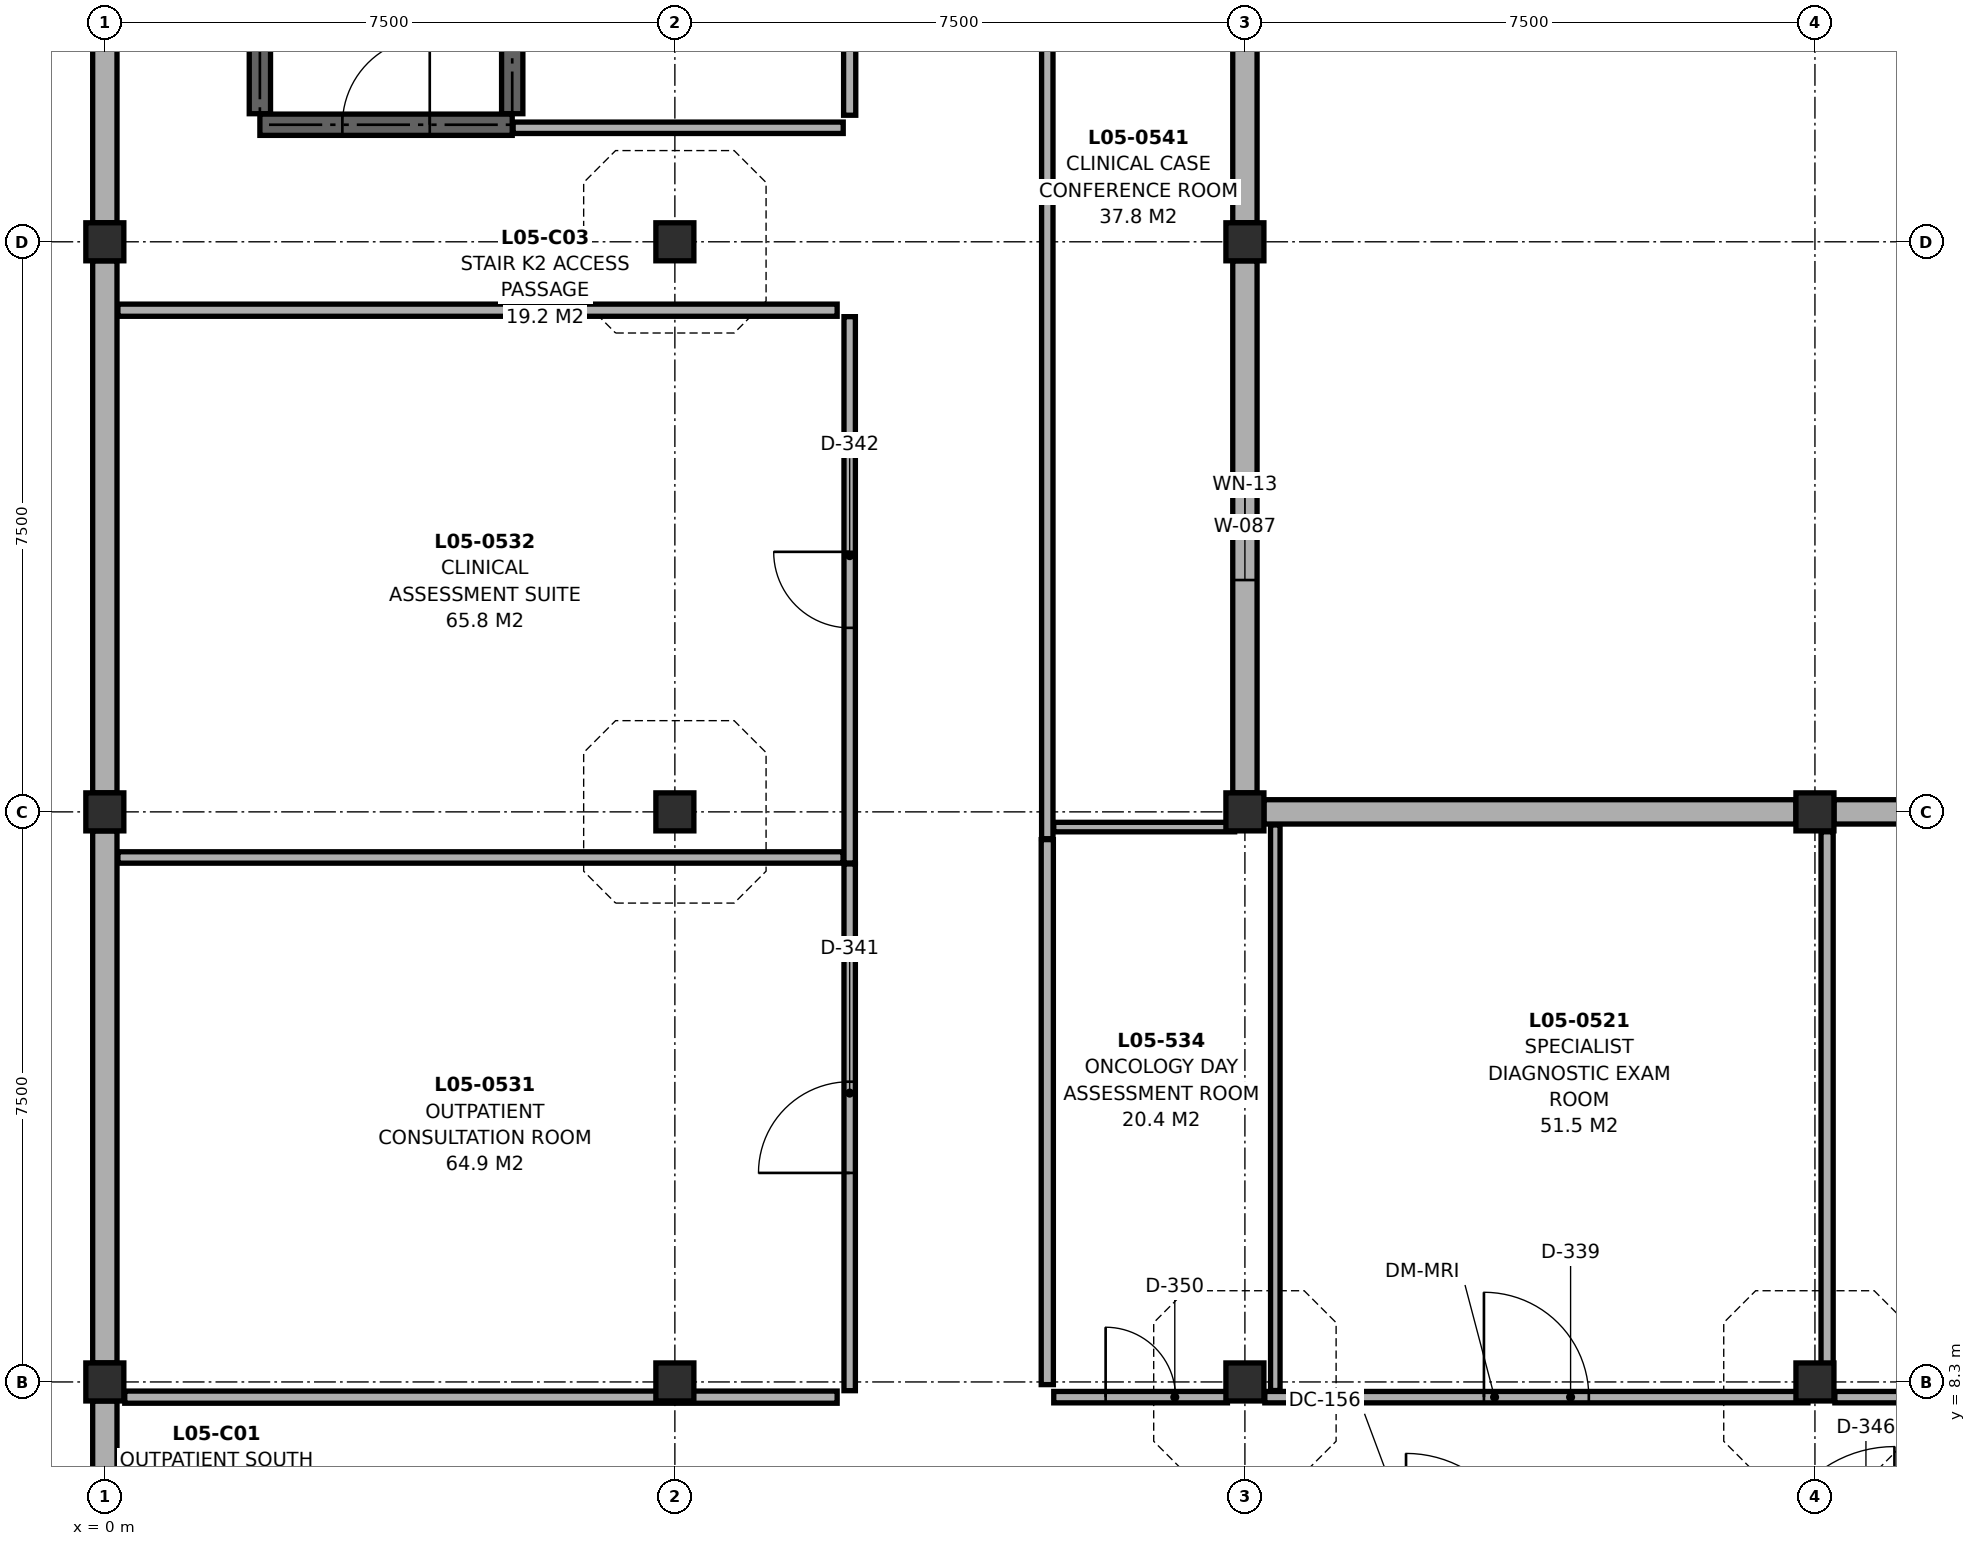
"""IFC4 building model, lengths in metres.
Left out: names, types, materials, properties, quantities, classifications, styles, units other than length and angle.
Written with IfcOpenShell. Run it as: python <this file> out.ifc"""

import sys

from ifc_helpers import new_model, si_unit, direction, frame, frame_2d, origin, origin_2d, place, context, subcontext, project, spatial, rectangle, extrude, element, fill, save


model = new_model("IFC4")
c1 = context("Model", 3, precision=1e-05, world=origin(), true_north=direction((0.0, 1.0)))
c2 = subcontext(c1, "Body", "Model", "MODEL_VIEW")
j1 = project(units=[si_unit("LENGTHUNIT", "METRE"), si_unit("PLANEANGLEUNIT", "RADIAN")], contexts=[c1])
p1 = place(None, origin())
s1 = spatial("IfcSite", under=j1, at=p1, CompositionType="ELEMENT")
p2 = place(p1, origin())
s2 = spatial("IfcBuilding", under=s1, at=p2, CompositionType="ELEMENT")
p3 = place(p2, frame((0.0, 0.0, 21.5)))
s3 = spatial("IfcBuildingStorey", under=s2, at=p3, CompositionType="ELEMENT", Elevation=21.5)
p4 = place(p3, frame((0.0, 8.3, 0.0), z_axis=(0.0, 0.0, 1.0), x_axis=(1.0, 0.0, 0.0)))
e1 = element("IfcColumn", 1, at=p4, inside=s3, PredefinedType="COLUMN", context=c2, shape_type="SweptSolid", body=[
    extrude(rectangle(XDim=0.5, YDim=0.5, at=origin_2d()), origin(), (0.0, 0.0, 1.0), 3.83),
])
for number, where, z_axis, x_axis in (
    (2, (0.0, 15.8, 0.0), (0.0, 0.0, 1.0), (1.0, 0.0, 0.0)),
    (3, (0.0, 23.3, 0.0), (0.0, 0.0, 1.0), (1.0, 0.0, 0.0)),
):
    element("IfcColumn", number, at=place(p3, frame(where, z_axis=z_axis, x_axis=x_axis)), inside=s3, PredefinedType="COLUMN", context=c2, shape_type="SweptSolid", body=[
        extrude(rectangle(XDim=0.5, YDim=0.5, at=origin_2d()), origin(), (0.0, 0.0, 1.0), 3.8),
    ])
p5 = place(p3, frame((7.5, 8.3, 0.0), z_axis=(0.0, 0.0, 1.0), x_axis=(1.0, 0.0, 0.0)))
e4 = element("IfcColumn", 4, at=p5, inside=s3, PredefinedType="COLUMN", context=c2, shape_type="SweptSolid", body=[
    extrude(rectangle(XDim=0.5, YDim=0.5, at=origin_2d()), origin(), (0.0, 0.0, 1.0), 4.08),
])
for number, where, z_axis, x_axis in (
    (5, (7.5, 15.8, 0.0), (0.0, 0.0, 1.0), (1.0, 0.0, 0.0)),
    (6, (7.5, 23.3, 0.0), (0.0, 0.0, 1.0), (1.0, 0.0, 0.0)),
):
    element("IfcColumn", number, at=place(p3, frame(where, z_axis=z_axis, x_axis=x_axis)), inside=s3, PredefinedType="COLUMN", context=c2, shape_type="SweptSolid", body=[
        extrude(rectangle(XDim=0.5, YDim=0.5, at=origin_2d()), origin(), (0.0, 0.0, 1.0), 3.8),
    ])
p6 = place(p3, frame((15.0, 8.3, 0.0), z_axis=(0.0, 0.0, 1.0), x_axis=(1.0, 0.0, 0.0)))
e7 = element("IfcColumn", 7, at=p6, inside=s3, PredefinedType="COLUMN", context=c2, shape_type="SweptSolid", body=[
    extrude(rectangle(XDim=0.5, YDim=0.5, at=origin_2d()), origin(), (0.0, 0.0, 1.0), 4.33),
])
for number, where, z_axis, x_axis in (
    (8, (15.0, 15.8, 0.0), (0.0, 0.0, 1.0), (1.0, 0.0, 0.0)),
    (9, (15.0, 23.3, 0.0), (0.0, 0.0, 1.0), (1.0, 0.0, 0.0)),
):
    element("IfcColumn", number, at=place(p3, frame(where, z_axis=z_axis, x_axis=x_axis)), inside=s3, PredefinedType="COLUMN", context=c2, shape_type="SweptSolid", body=[
        extrude(rectangle(XDim=0.5, YDim=0.5, at=origin_2d()), origin(), (0.0, 0.0, 1.0), 3.8),
    ])
for number, where, z_axis, x_axis in (
    (10, (22.5, 8.3, 0.0), (0.0, 0.0, 1.0), (1.0, 0.0, 0.0)),
    (11, (22.5, 15.8, 0.0), (0.0, 0.0, 1.0), (1.0, 0.0, 0.0)),
):
    element("IfcColumn", number, at=place(p3, frame(where, z_axis=z_axis, x_axis=x_axis)), inside=s3, PredefinedType="COLUMN", context=c2, shape_type="SweptSolid", body=[
        extrude(rectangle(XDim=0.5, YDim=0.5, at=origin_2d()), origin(), (0.0, 0.0, 1.0), 4.58),
    ])
p7 = place(p3, frame((15.0, 30.55, 0.0), z_axis=(0.0, 0.0, 1.0), x_axis=(0.0, -1.0, 0.0)))
e12 = element("IfcWall", 12, at=p7, inside=s3, PredefinedType="SOLIDWALL", context=c2, shape_type="SweptSolid", body=[
    extrude(rectangle(XDim=7.0, YDim=0.32, at=frame_2d((3.5, 0.0))), origin(), (0.0, 0.0, 1.0), 3.7),
])
p8 = place(p7, frame((2.8, 0.0, 0.9)))
e13 = element("IfcOpeningElement", 13, at=p8, cuts=e12, PredefinedType="OPENING", context=c2, shape_type="SweptSolid", body=[
    extrude(rectangle(XDim=1.4, YDim=1.9, at=frame_2d((0.7, 0.95))), frame((0.0, 0.172, 0.0), z_axis=(0.0, -1.0, 0.0), x_axis=(1.0, 0.0, 0.0)), (0.0, 0.0, 1.0), 0.344),
])
p9 = place(p3, frame((15.0, 23.05, 0.0), z_axis=(0.0, 0.0, 1.0), x_axis=(0.0, -1.0, 0.0)))
e14 = element("IfcWall", 14, at=p9, inside=s3, PredefinedType="SOLIDWALL", context=c2, shape_type="SweptSolid", body=[
    extrude(rectangle(XDim=7.0, YDim=0.32, at=frame_2d((3.5, 0.0))), origin(), (0.0, 0.0, 1.0), 3.7),
])
p10 = place(p9, frame((2.8, 0.0, 0.9)))
e15 = element("IfcOpeningElement", 15, at=p10, cuts=e14, PredefinedType="OPENING", context=c2, shape_type="SweptSolid", body=[
    extrude(rectangle(XDim=1.4, YDim=1.3, at=frame_2d((0.7, 0.65))), frame((0.0, 0.172, 0.0), z_axis=(0.0, -1.0, 0.0), x_axis=(1.0, 0.0, 0.0)), (0.0, 0.0, 1.0), 0.344),
])
for number, where, z_axis, x_axis in (
    (16, (15.25, 15.8, 0.0), (0.0, 0.0, 1.0), (1.0, 0.0, 0.0)),
    (17, (22.75, 15.8, 0.0), (0.0, 0.0, 1.0), (1.0, 0.0, 0.0)),
    (18, (0.0, 1.05, 0.0), (0.0, 0.0, 1.0), (0.0, 1.0, 0.0)),
    (19, (0.0, 8.55, 0.0), (0.0, 0.0, 1.0), (0.0, 1.0, 0.0)),
    (20, (0.0, 16.05, 0.0), (0.0, 0.0, 1.0), (0.0, 1.0, 0.0)),
):
    element("IfcWall", number, at=place(p3, frame(where, z_axis=z_axis, x_axis=x_axis)), inside=s3, PredefinedType="SOLIDWALL", context=c2, shape_type="SweptSolid", body=[
        extrude(rectangle(XDim=7.0, YDim=0.32, at=frame_2d((3.5, 0.0))), origin(), (0.0, 0.0, 1.0), 3.7),
    ])
p11 = place(p3, frame((0.0, 23.55, 0.0), z_axis=(0.0, 0.0, 1.0), x_axis=(0.0, 1.0, 0.0)))
e21 = element("IfcWall", 21, at=p11, inside=s3, PredefinedType="SOLIDWALL", context=c2, shape_type="SweptSolid", body=[
    extrude(rectangle(XDim=7.0, YDim=0.32, at=frame_2d((3.5, 0.0))), origin(), (0.0, 0.0, 1.0), 3.7),
])
p12 = place(p11, frame((2.8, 0.0, 0.9)))
e22 = element("IfcOpeningElement", 22, at=p12, cuts=e21, PredefinedType="OPENING", context=c2, shape_type="SweptSolid", body=[
    extrude(rectangle(XDim=1.4, YDim=1.3, at=frame_2d((0.7, 0.65))), frame((0.0, 0.172, 0.0), z_axis=(0.0, -1.0, 0.0), x_axis=(1.0, 0.0, 0.0)), (0.0, 0.0, 1.0), 0.344),
])
for number, where, z_axis, x_axis in (
    (23, (5.36, 24.985, 0.0), (0.0, 0.0, 1.0), (0.0, 1.0, 0.0)),
    (24, (2.04, 32.215, 0.0), (0.0, 0.0, 1.0), (0.0, -1.0, 0.0)),
):
    element("IfcWall", number, at=place(p3, frame(where, z_axis=z_axis, x_axis=x_axis)), inside=s3, PredefinedType="SHEAR", context=c2, shape_type="SweptSolid", body=[
        extrude(rectangle(XDim=7.23, YDim=0.28, at=frame_2d((3.615, 0.0))), origin(), (0.0, 0.0, 1.0), 3.72),
    ])
p13 = place(p3, frame((2.04, 24.84, 0.0), z_axis=(0.0, 0.0, 1.0), x_axis=(1.0, 0.0, 0.0)))
e25 = element("IfcWall", 25, at=p13, inside=s3, PredefinedType="SHEAR", context=c2, shape_type="SweptSolid", body=[
    extrude(rectangle(XDim=3.32, YDim=0.28, at=frame_2d((1.66, 0.0))), origin(), (0.0, 0.0, 1.0), 3.72),
])
p14 = place(p13, frame((1.085, 0.0, 0.0)))
e26 = element("IfcOpeningElement", 26, at=p14, cuts=e25, PredefinedType="OPENING", context=c2, shape_type="SweptSolid", body=[
    extrude(rectangle(XDim=1.15, YDim=2.15, at=frame_2d((0.575, 1.075))), frame((0.0, 0.152, 0.0), z_axis=(0.0, -1.0, 0.0), x_axis=(1.0, 0.0, 0.0)), (0.0, 0.0, 1.0), 0.304),
])
p15 = place(p3, frame((15.262, 8.1, 0.0), z_axis=(0.0, 0.0, 1.0), x_axis=(1.0, 0.0, 0.0)))
e27 = element("IfcWall", 27, at=p15, inside=s3, PredefinedType="PARTITIONING", context=c2, shape_type="SweptSolid", body=[
    extrude(rectangle(XDim=7.146, YDim=0.15, at=frame_2d((3.573, 0.0))), origin(), (0.0, 0.0, 1.0), 3.7),
])
p16 = place(p15, frame((2.883, 0.0, 0.0)))
e28 = element("IfcOpeningElement", 28, at=p16, cuts=e27, PredefinedType="OPENING", context=c2, shape_type="SweptSolid", body=[
    extrude(rectangle(XDim=1.38, YDim=2.3, at=frame_2d((0.69, 1.15))), frame((0.0, 0.087, 0.0), z_axis=(0.0, -1.0, 0.0), x_axis=(1.0, 0.0, 0.0)), (0.0, 0.0, 1.0), 0.174),
])
p17 = place(p3, frame((22.762, 8.1, 0.0), z_axis=(0.0, 0.0, 1.0), x_axis=(1.0, 0.0, 0.0)))
e29 = element("IfcWall", 29, at=p17, inside=s3, PredefinedType="PARTITIONING", context=c2, shape_type="SweptSolid", body=[
    extrude(rectangle(XDim=6.976, YDim=0.15, at=frame_2d((3.488, 0.0))), origin(), (0.0, 0.0, 1.0), 3.7),
])
p18 = place(p17, frame((2.768, 0.0, 0.0)))
e30 = element("IfcOpeningElement", 30, at=p18, cuts=e29, PredefinedType="OPENING", context=c2, shape_type="SweptSolid", body=[
    extrude(rectangle(XDim=1.44, YDim=2.32, at=frame_2d((0.72, 1.16))), frame((0.0, 0.087, 0.0), z_axis=(0.0, -1.0, 0.0), x_axis=(1.0, 0.0, 0.0)), (0.0, 0.0, 1.0), 0.174),
])
p19 = place(p3, frame((9.8, 8.185, 0.0), z_axis=(0.0, 0.0, 1.0), x_axis=(0.0, 1.0, 0.0)))
e31 = element("IfcWall", 31, at=p19, inside=s3, PredefinedType="PARTITIONING", context=c2, shape_type="SweptSolid", body=[
    extrude(rectangle(XDim=6.93, YDim=0.15, at=frame_2d((3.465, 0.0))), origin(), (0.0, 0.0, 1.0), 3.7),
])
p20 = place(p19, frame((2.865, 0.0, 0.0)))
e32 = element("IfcOpeningElement", 32, at=p20, cuts=e31, PredefinedType="OPENING", context=c2, shape_type="SweptSolid", body=[
    extrude(rectangle(XDim=1.2, YDim=2.15, at=frame_2d((0.6, 1.075))), frame((0.0, 0.087, 0.0), z_axis=(0.0, -1.0, 0.0), x_axis=(1.0, 0.0, 0.0)), (0.0, 0.0, 1.0), 0.174),
])
p21 = place(p3, frame((9.8, 15.127, 0.0), z_axis=(0.0, 0.0, 1.0), x_axis=(0.0, 1.0, 0.0)))
e33 = element("IfcWall", 33, at=p21, inside=s3, PredefinedType="PARTITIONING", context=c2, shape_type="SweptSolid", body=[
    extrude(rectangle(XDim=7.188, YDim=0.15, at=frame_2d((3.594, 0.0))), origin(), (0.0, 0.0, 1.0), 3.7),
])
p22 = place(p21, frame((3.094, 0.0, 0.0)))
e34 = element("IfcOpeningElement", 34, at=p22, cuts=e33, PredefinedType="OPENING", context=c2, shape_type="SweptSolid", body=[
    extrude(rectangle(XDim=1.0, YDim=2.22, at=frame_2d((0.5, 1.11))), frame((0.0, 0.087, 0.0), z_axis=(0.0, -1.0, 0.0), x_axis=(1.0, 0.0, 0.0)), (0.0, 0.0, 1.0), 0.174),
])
p23 = place(p3, frame((12.485, 8.1, 0.0), z_axis=(0.0, 0.0, 1.0), x_axis=(1.0, 0.0, 0.0)))
e35 = element("IfcWall", 35, at=p23, inside=s3, PredefinedType="PARTITIONING", context=c2, shape_type="SweptSolid", body=[
    extrude(rectangle(XDim=2.285, YDim=0.15, at=frame_2d((1.143, 0.0))), origin(), (0.0, 0.0, 1.0), 3.7),
])
p24 = place(p23, frame((0.683, 0.0, 0.0)))
e36 = element("IfcOpeningElement", 36, at=p24, cuts=e35, PredefinedType="OPENING", context=c2, shape_type="SweptSolid", body=[
    extrude(rectangle(XDim=0.92, YDim=2.1, at=frame_2d((0.46, 1.05))), frame((0.0, 0.087, 0.0), z_axis=(0.0, -1.0, 0.0), x_axis=(1.0, 0.0, 0.0)), (0.0, 0.0, 1.0), 0.174),
])
p25 = place(p3, frame((5.372, 24.8, 0.0), z_axis=(0.0, 0.0, 1.0), x_axis=(1.0, 0.0, 0.0)))
e37 = element("IfcWall", 37, at=p25, inside=s3, PredefinedType="PARTITIONING", context=c2, shape_type="SweptSolid", body=[
    extrude(rectangle(XDim=4.343, YDim=0.15, at=frame_2d((2.171, 0.0))), origin(), (0.0, 0.0, 1.0), 3.7),
])
p26 = place(p3, frame((12.485, 15.6, 0.0), z_axis=(0.0, 0.0, 1.0), x_axis=(1.0, 0.0, 0.0)))
e38 = element("IfcWall", 38, at=p26, inside=s3, PredefinedType="PARTITIONING", context=c2, shape_type="SweptSolid", body=[
    extrude(rectangle(XDim=2.38, YDim=0.125, at=frame_2d((1.19, 0.0))), origin(), (0.0, 0.0, 1.0), 3.7),
])
p27 = place(p3, frame((15.4, 8.187, 0.0), z_axis=(0.0, 0.0, 1.0), x_axis=(0.0, 1.0, 0.0)))
e39 = element("IfcWall", 39, at=p27, inside=s3, PredefinedType="PARTITIONING", context=c2, shape_type="SweptSolid", body=[
    extrude(rectangle(XDim=7.441, YDim=0.125, at=frame_2d((3.72, 0.0))), origin(), (0.0, 0.0, 1.0), 3.7),
])
p28 = place(p3, frame((22.66, 8.432, 0.0), z_axis=(0.0, 0.0, 1.0), x_axis=(0.0, 1.0, 0.0)))
e40 = element("IfcWall", 40, at=p28, inside=s3, PredefinedType="PARTITIONING", context=c2, shape_type="SweptSolid", body=[
    extrude(rectangle(XDim=7.106, YDim=0.16, at=frame_2d((3.553, 0.0))), origin(), (0.0, 0.0, 1.0), 3.7),
])
p29 = place(p3, frame((0.262, 8.1, 0.0), z_axis=(0.0, 0.0, 1.0), x_axis=(1.0, 0.0, 0.0)))
e41 = element("IfcWall", 41, at=p29, inside=s3, PredefinedType="PARTITIONING", context=c2, shape_type="SweptSolid", body=[
    extrude(rectangle(XDim=9.373, YDim=0.16, at=frame_2d((4.687, 0.0))), origin(), (0.0, 0.0, 1.0), 3.7),
])
p30 = place(p3, frame((0.172, 15.2, 0.0), z_axis=(0.0, 0.0, 1.0), x_axis=(1.0, 0.0, 0.0)))
e42 = element("IfcWall", 42, at=p30, inside=s3, PredefinedType="PARTITIONING", context=c2, shape_type="SweptSolid", body=[
    extrude(rectangle(XDim=9.541, YDim=0.15, at=frame_2d((4.771, 0.0))), origin(), (0.0, 0.0, 1.0), 3.7),
])
p31 = place(p3, frame((0.172, 22.4, 0.0), z_axis=(0.0, 0.0, 1.0), x_axis=(1.0, 0.0, 0.0)))
e43 = element("IfcWall", 43, at=p31, inside=s3, PredefinedType="PARTITIONING", context=c2, shape_type="SweptSolid", body=[
    extrude(rectangle(XDim=9.463, YDim=0.16, at=frame_2d((4.731, 0.0))), origin(), (0.0, 0.0, 1.0), 3.7),
])
p32 = place(p3, frame((9.8, 24.965, 0.0), z_axis=(0.0, 0.0, 1.0), x_axis=(0.0, 1.0, 0.0)))
e44 = element("IfcWall", 44, at=p32, inside=s3, PredefinedType="PARTITIONING", context=c2, shape_type="SweptSolid", body=[
    extrude(rectangle(XDim=8.07, YDim=0.16, at=frame_2d((4.035, 0.0))), origin(), (0.0, 0.0, 1.0), 3.7),
])
p33 = place(p3, frame((12.4, 8.265, 0.0), z_axis=(0.0, 0.0, 1.0), x_axis=(0.0, 1.0, 0.0)))
e45 = element("IfcWall", 45, at=p33, inside=s3, PredefinedType="PARTITIONING", context=c2, shape_type="SweptSolid", body=[
    extrude(rectangle(XDim=7.17, YDim=0.16, at=frame_2d((3.585, 0.0))), origin(), (0.0, 0.0, 1.0), 3.7),
])
p34 = place(p3, frame((12.4, 15.447, 0.0), z_axis=(0.0, 0.0, 1.0), x_axis=(0.0, 1.0, 0.0)))
e46 = element("IfcWall", 46, at=p34, inside=s3, PredefinedType="PARTITIONING", context=c2, shape_type="SweptSolid", body=[
    extrude(rectangle(XDim=17.588, YDim=0.15, at=frame_2d((8.794, 0.0))), origin(), (0.0, 0.0, 1.0), 3.7),
])
p35 = place(p10, origin())
e47 = element("IfcWindow", 47, at=p35, inside=s3, PartitioningType="SINGLE_PANEL", PredefinedType="WINDOW", context=c2, shape_type="SweptSolid", body=[
    extrude(rectangle(XDim=1.4, YDim=1.3, at=frame_2d((0.7, 0.65))), frame((0.0, 0.03, 0.0), z_axis=(0.0, -1.0, 0.0), x_axis=(1.0, 0.0, 0.0)), (0.0, 0.0, 1.0), 0.06),
])
fill(e15, e47)
p36 = place(p14, origin())
e48 = element("IfcDoor", 48, at=p36, inside=s3, OperationType="SINGLE_SWING_RIGHT", PredefinedType="DOOR", context=c2, shape_type="SweptSolid", body=[
    extrude(rectangle(XDim=1.15, YDim=2.15, at=frame_2d((0.575, 1.075))), frame((0.0, 0.025, 0.0), z_axis=(0.0, -1.0, 0.0), x_axis=(1.0, 0.0, 0.0)), (0.0, 0.0, 1.0), 0.05),
])
fill(e26, e48)
p37 = place(p16, origin())
e49 = element("IfcDoor", 49, at=p37, inside=s3, OperationType="SINGLE_SWING_LEFT", PredefinedType="DOOR", context=c2, shape_type="SweptSolid", body=[
    extrude(rectangle(XDim=1.38, YDim=2.3, at=frame_2d((0.69, 1.15))), frame((0.0, 0.025, 0.0), z_axis=(0.0, -1.0, 0.0), x_axis=(1.0, 0.0, 0.0)), (0.0, 0.0, 1.0), 0.05),
])
fill(e28, e49)
p38 = place(p20, origin())
e50 = element("IfcDoor", 50, at=p38, inside=s3, OperationType="SINGLE_SWING_LEFT", PredefinedType="DOOR", context=c2, shape_type="SweptSolid", body=[
    extrude(rectangle(XDim=1.2, YDim=2.15, at=frame_2d((0.6, 1.075))), frame((0.0, 0.025, 0.0), z_axis=(0.0, -1.0, 0.0), x_axis=(1.0, 0.0, 0.0)), (0.0, 0.0, 1.0), 0.05),
])
fill(e32, e50)
p39 = place(p22, origin())
e51 = element("IfcDoor", 51, at=p39, inside=s3, OperationType="SINGLE_SWING_RIGHT", PredefinedType="DOOR", context=c2, shape_type="SweptSolid", body=[
    extrude(rectangle(XDim=1.0, YDim=2.22, at=frame_2d((0.5, 1.11))), frame((0.0, 0.025, 0.0), z_axis=(0.0, -1.0, 0.0), x_axis=(1.0, 0.0, 0.0)), (0.0, 0.0, 1.0), 0.05),
])
fill(e34, e51)
p40 = place(p24, origin())
e52 = element("IfcDoor", 52, at=p40, inside=s3, OperationType="SINGLE_SWING_LEFT", PredefinedType="DOOR", context=c2, shape_type="SweptSolid", body=[
    extrude(rectangle(XDim=0.92, YDim=2.1, at=frame_2d((0.46, 1.05))), frame((0.0, 0.025, 0.0), z_axis=(0.0, -1.0, 0.0), x_axis=(1.0, 0.0, 0.0)), (0.0, 0.0, 1.0), 0.05),
])
fill(e36, e52)
save(model, sys.argv[1])
